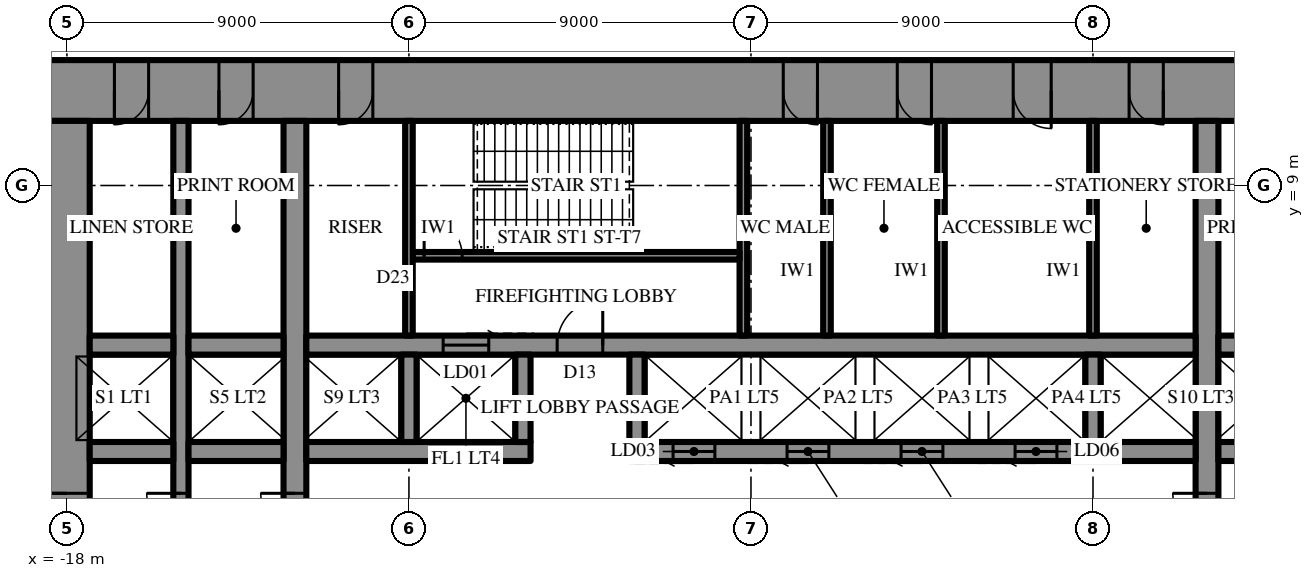
"""IFC4 building model, lengths in metres.
Left out: names, types, materials, properties, quantities, classifications, styles, units other than length and angle.
Written with IfcOpenShell. Run it as: python <this file> out.ifc"""

import sys

from ifc_helpers import new_model, si_unit, direction, frame, frame_2d, origin, place, context, subcontext, project, spatial, rectangle, extrude, element, fill, save


model = new_model("IFC4")
c1 = context("Model", 3, precision=1e-05, world=origin(), true_north=direction((0.0, 1.0)))
c2 = subcontext(c1, "Body", "Model", "MODEL_VIEW")
j1 = project(units=[si_unit("LENGTHUNIT", "METRE"), si_unit("PLANEANGLEUNIT", "RADIAN")], contexts=[c1])
p1 = place(None, origin())
s1 = spatial("IfcSite", under=j1, at=p1, CompositionType="ELEMENT")
p2 = place(p1, origin())
s2 = spatial("IfcBuilding", under=s1, at=p2, CompositionType="ELEMENT")
p3 = place(p2, frame((0.0, 0.0, 13.0)))
s3 = spatial("IfcBuildingStorey", under=s2, at=p3, CompositionType="ELEMENT", Elevation=13.0)
p4 = place(p3, frame((-18.6, 11.5, 0.0), z_axis=(0.0, 0.0, 1.0), x_axis=(1.0, 0.0, 0.0)))
e1 = element("IfcWall", 1, at=p4, inside=s3, PredefinedType="SHEAR", context=c2, shape_type="SweptSolid", body=[
    extrude(rectangle(XDim=37.2, YDim=1.6, at=frame_2d((18.6, 0.0))), origin(), (0.0, 0.0, 1.0), 5.5),
])
p5 = place(p4, frame((19.45, 0.0, 0.0)))
e2 = element("IfcOpeningElement", 2, at=p5, cuts=e1, PredefinedType="OPENING", context=c2, shape_type="SweptSolid", body=[
    extrude(rectangle(XDim=0.9, YDim=2.2, at=frame_2d((0.45, 1.1))), frame((0.0, 0.81, 0.0), z_axis=(0.0, -1.0, 0.0), x_axis=(1.0, 0.0, 0.0)), (0.0, 0.0, 1.0), 1.62),
])
p6 = place(p4, frame((22.45, 0.0, 0.0)))
e3 = element("IfcOpeningElement", 3, at=p6, cuts=e1, PredefinedType="OPENING", context=c2, shape_type="SweptSolid", body=[
    extrude(rectangle(XDim=0.9, YDim=2.2, at=frame_2d((0.45, 1.1))), frame((0.0, 0.81, 0.0), z_axis=(0.0, -1.0, 0.0), x_axis=(1.0, 0.0, 0.0)), (0.0, 0.0, 1.0), 1.62),
])
p7 = place(p4, frame((25.5, 0.0, 0.0)))
e4 = element("IfcOpeningElement", 4, at=p7, cuts=e1, PredefinedType="OPENING", context=c2, shape_type="SweptSolid", body=[
    extrude(rectangle(XDim=1.0, YDim=2.2, at=frame_2d((0.5, 1.1))), frame((0.0, 0.81, 0.0), z_axis=(0.0, -1.0, 0.0), x_axis=(1.0, 0.0, 0.0)), (0.0, 0.0, 1.0), 1.62),
])
p8 = place(p4, frame((1.85, 0.0, 0.0)))
e5 = element("IfcOpeningElement", 5, at=p8, cuts=e1, PredefinedType="OPENING", context=c2, shape_type="SweptSolid", body=[
    extrude(rectangle(XDim=0.9, YDim=2.2, at=frame_2d((0.45, 1.1))), frame((0.0, 0.81, 0.0), z_axis=(0.0, -1.0, 0.0), x_axis=(1.0, 0.0, 0.0)), (0.0, 0.0, 1.0), 1.62),
])
p9 = place(p4, frame((4.6, 0.0, 0.0)))
e6 = element("IfcOpeningElement", 6, at=p9, cuts=e1, PredefinedType="OPENING", context=c2, shape_type="SweptSolid", body=[
    extrude(rectangle(XDim=0.9, YDim=2.2, at=frame_2d((0.45, 1.1))), frame((0.0, 0.81, 0.0), z_axis=(0.0, -1.0, 0.0), x_axis=(1.0, 0.0, 0.0)), (0.0, 0.0, 1.0), 1.62),
])
p10 = place(p4, frame((7.75, 0.0, 0.0)))
e7 = element("IfcOpeningElement", 7, at=p10, cuts=e1, PredefinedType="OPENING", context=c2, shape_type="SweptSolid", body=[
    extrude(rectangle(XDim=0.9, YDim=2.2, at=frame_2d((0.45, 1.1))), frame((0.0, 0.81, 0.0), z_axis=(0.0, -1.0, 0.0), x_axis=(1.0, 0.0, 0.0)), (0.0, 0.0, 1.0), 1.62),
])
p11 = place(p4, frame((28.55, 0.0, 0.0)))
e8 = element("IfcOpeningElement", 8, at=p11, cuts=e1, PredefinedType="OPENING", context=c2, shape_type="SweptSolid", body=[
    extrude(rectangle(XDim=0.9, YDim=2.2, at=frame_2d((0.45, 1.1))), frame((0.0, 0.81, 0.0), z_axis=(0.0, -1.0, 0.0), x_axis=(1.0, 0.0, 0.0)), (0.0, 0.0, 1.0), 1.62),
])
p12 = place(p4, frame((31.7, 0.0, 0.0)))
e9 = element("IfcOpeningElement", 9, at=p12, cuts=e1, PredefinedType="OPENING", context=c2, shape_type="SweptSolid", body=[
    extrude(rectangle(XDim=0.9, YDim=2.2, at=frame_2d((0.45, 1.1))), frame((0.0, 0.81, 0.0), z_axis=(0.0, -1.0, 0.0), x_axis=(1.0, 0.0, 0.0)), (0.0, 0.0, 1.0), 1.62),
])
p13 = place(p4, frame((34.45, 0.0, 0.0)))
e10 = element("IfcOpeningElement", 10, at=p13, cuts=e1, PredefinedType="OPENING", context=c2, shape_type="SweptSolid", body=[
    extrude(rectangle(XDim=0.9, YDim=2.2, at=frame_2d((0.45, 1.1))), frame((0.0, 0.81, 0.0), z_axis=(0.0, -1.0, 0.0), x_axis=(1.0, 0.0, 0.0)), (0.0, 0.0, 1.0), 1.62),
])
p14 = place(p3, frame((-18.0, 10.7, 0.0), z_axis=(0.0, 0.0, 1.0), x_axis=(0.0, -1.0, 0.0)))
e11 = element("IfcWall", 11, at=p14, inside=s3, PredefinedType="SHEAR", context=c2, shape_type="SweptSolid", body=[
    extrude(rectangle(XDim=21.4, YDim=1.2, at=frame_2d((10.7, 0.0))), origin(), (0.0, 0.0, 1.0), 5.5),
])
p15 = place(p14, frame((9.8, 0.0, 0.0)))
e12 = element("IfcOpeningElement", 12, at=p15, cuts=e11, PredefinedType="OPENING", context=c2, shape_type="SweptSolid", body=[
    extrude(rectangle(XDim=1.8, YDim=2.4, at=frame_2d((0.9, 1.2))), frame((0.0, 0.61, 0.0), z_axis=(0.0, -1.0, 0.0), x_axis=(1.0, 0.0, 0.0)), (0.0, 0.0, 1.0), 1.22),
])
p16 = place(p3, frame((12.0, -10.7, 0.0), z_axis=(0.0, 0.0, 1.0), x_axis=(0.0, 1.0, 0.0)))
e13 = element("IfcWall", 13, at=p16, inside=s3, PredefinedType="SHEAR", context=c2, shape_type="SweptSolid", body=[
    extrude(rectangle(XDim=21.4, YDim=0.6, at=frame_2d((10.7, 0.0))), origin(), (0.0, 0.0, 1.0), 5.5),
])
p17 = place(p16, frame((9.8, 0.0, 0.0)))
e14 = element("IfcOpeningElement", 14, at=p17, cuts=e13, PredefinedType="OPENING", context=c2, shape_type="SweptSolid", body=[
    extrude(rectangle(XDim=1.8, YDim=2.4, at=frame_2d((0.9, 1.2))), frame((0.0, 0.31, 0.0), z_axis=(0.0, -1.0, 0.0), x_axis=(1.0, 0.0, 0.0)), (0.0, 0.0, 1.0), 0.62),
])
p18 = place(p3, frame((-12.0, -10.7, 0.0), z_axis=(0.0, 0.0, 1.0), x_axis=(0.0, 1.0, 0.0)))
e15 = element("IfcWall", 15, at=p18, inside=s3, PredefinedType="SHEAR", context=c2, shape_type="SweptSolid", body=[
    extrude(rectangle(XDim=21.4, YDim=0.6, at=frame_2d((10.7, 0.0))), origin(), (0.0, 0.0, 1.0), 5.5),
])
p19 = place(p18, frame((9.8, 0.0, 0.0)))
e16 = element("IfcOpeningElement", 16, at=p19, cuts=e15, PredefinedType="OPENING", context=c2, shape_type="SweptSolid", body=[
    extrude(rectangle(XDim=1.8, YDim=2.4, at=frame_2d((0.9, 1.2))), frame((0.0, 0.31, 0.0), z_axis=(0.0, -1.0, 0.0), x_axis=(1.0, 0.0, 0.0)), (0.0, 0.0, 1.0), 0.62),
])
p20 = place(p3, frame((-15.0, -10.7, 0.0), z_axis=(0.0, 0.0, 1.0), x_axis=(0.0, 1.0, 0.0)))
e17 = element("IfcWall", 17, at=p20, inside=s3, PredefinedType="SHEAR", context=c2, shape_type="SweptSolid", body=[
    extrude(rectangle(XDim=21.4, YDim=0.4, at=frame_2d((10.7, 0.0))), origin(), (0.0, 0.0, 1.0), 5.5),
])
p21 = place(p20, frame((9.8, 0.0, 0.0)))
e18 = element("IfcOpeningElement", 18, at=p21, cuts=e17, PredefinedType="OPENING", context=c2, shape_type="SweptSolid", body=[
    extrude(rectangle(XDim=1.8, YDim=2.4, at=frame_2d((0.9, 1.2))), frame((0.0, 0.21, 0.0), z_axis=(0.0, -1.0, 0.0), x_axis=(1.0, 0.0, 0.0)), (0.0, 0.0, 1.0), 0.42),
])
p22 = place(p3, frame((-17.4, 2.0, 0.0), z_axis=(0.0, 0.0, 1.0), x_axis=(1.0, 0.0, 0.0)))
e19 = element("IfcWall", 19, at=p22, inside=s3, PredefinedType="SHEAR", context=c2, shape_type="SweptSolid", body=[
    extrude(rectangle(XDim=2.2, YDim=0.5, at=frame_2d((1.1, 0.0))), origin(), (0.0, 0.0, 1.0), 5.5),
])
p23 = place(p3, frame((-14.8, 2.0, 0.0), z_axis=(0.0, 0.0, 1.0), x_axis=(1.0, 0.0, 0.0)))
e20 = element("IfcWall", 20, at=p23, inside=s3, PredefinedType="SHEAR", context=c2, shape_type="SweptSolid", body=[
    extrude(rectangle(XDim=2.5, YDim=0.5, at=frame_2d((1.25, 0.0))), origin(), (0.0, 0.0, 1.0), 5.5),
])
p24 = place(p3, frame((-11.7, 2.0, 0.0), z_axis=(0.0, 0.0, 1.0), x_axis=(1.0, 0.0, 0.0)))
e21 = element("IfcWall", 21, at=p24, inside=s3, PredefinedType="SHEAR", context=c2, shape_type="SweptSolid", body=[
    extrude(rectangle(XDim=5.9, YDim=0.5, at=frame_2d((2.95, 0.0))), origin(), (0.0, 0.0, 1.0), 5.5),
])
p25 = place(p3, frame((-3.2, 2.0, 0.0), z_axis=(0.0, 0.0, 1.0), x_axis=(1.0, 0.0, 0.0)))
e22 = element("IfcWall", 22, at=p25, inside=s3, PredefinedType="SHEAR", context=c2, shape_type="SweptSolid", body=[
    extrude(rectangle(XDim=14.9, YDim=0.5, at=frame_2d((7.45, 0.0))), origin(), (0.0, 0.0, 1.0), 5.5),
])
p26 = place(p25, frame((1.15, 0.0, 0.0)))
e23 = element("IfcOpeningElement", 23, at=p26, cuts=e22, PredefinedType="OPENING", context=c2, shape_type="SweptSolid", body=[
    extrude(rectangle(XDim=1.1, YDim=2.2, at=frame_2d((0.55, 1.1))), frame((0.0, 0.26, 0.0), z_axis=(0.0, -1.0, 0.0), x_axis=(1.0, 0.0, 0.0)), (0.0, 0.0, 1.0), 0.52),
])
p27 = place(p25, frame((4.15, 0.0, 0.0)))
e24 = element("IfcOpeningElement", 24, at=p27, cuts=e22, PredefinedType="OPENING", context=c2, shape_type="SweptSolid", body=[
    extrude(rectangle(XDim=1.1, YDim=2.2, at=frame_2d((0.55, 1.1))), frame((0.0, 0.26, 0.0), z_axis=(0.0, -1.0, 0.0), x_axis=(1.0, 0.0, 0.0)), (0.0, 0.0, 1.0), 0.52),
])
p28 = place(p25, frame((7.15, 0.0, 0.0)))
e25 = element("IfcOpeningElement", 25, at=p28, cuts=e22, PredefinedType="OPENING", context=c2, shape_type="SweptSolid", body=[
    extrude(rectangle(XDim=1.1, YDim=2.2, at=frame_2d((0.55, 1.1))), frame((0.0, 0.26, 0.0), z_axis=(0.0, -1.0, 0.0), x_axis=(1.0, 0.0, 0.0)), (0.0, 0.0, 1.0), 0.52),
])
p29 = place(p25, frame((10.15, 0.0, 0.0)))
e26 = element("IfcOpeningElement", 26, at=p29, cuts=e22, PredefinedType="OPENING", context=c2, shape_type="SweptSolid", body=[
    extrude(rectangle(XDim=1.1, YDim=2.2, at=frame_2d((0.55, 1.1))), frame((0.0, 0.26, 0.0), z_axis=(0.0, -1.0, 0.0), x_axis=(1.0, 0.0, 0.0)), (0.0, 0.0, 1.0), 0.52),
])
p30 = place(p3, frame((12.3, 2.0, 0.0), z_axis=(0.0, 0.0, 1.0), x_axis=(1.0, 0.0, 0.0)))
e27 = element("IfcWall", 27, at=p30, inside=s3, PredefinedType="SHEAR", context=c2, shape_type="SweptSolid", body=[
    extrude(rectangle(XDim=2.5, YDim=0.5, at=frame_2d((1.25, 0.0))), origin(), (0.0, 0.0, 1.0), 5.5),
])
p31 = place(p3, frame((-17.4, 4.8, 0.0), z_axis=(0.0, 0.0, 1.0), x_axis=(1.0, 0.0, 0.0)))
e28 = element("IfcWall", 28, at=p31, inside=s3, PredefinedType="SHEAR", context=c2, shape_type="SweptSolid", body=[
    extrude(rectangle(XDim=2.2, YDim=0.5, at=frame_2d((1.1, 0.0))), origin(), (0.0, 0.0, 1.0), 5.5),
])
p32 = place(p3, frame((-14.8, 4.8, 0.0), z_axis=(0.0, 0.0, 1.0), x_axis=(1.0, 0.0, 0.0)))
e29 = element("IfcWall", 29, at=p32, inside=s3, PredefinedType="SHEAR", context=c2, shape_type="SweptSolid", body=[
    extrude(rectangle(XDim=2.5, YDim=0.5, at=frame_2d((1.25, 0.0))), origin(), (0.0, 0.0, 1.0), 5.5),
])
p33 = place(p3, frame((-11.7, 4.8, 0.0), z_axis=(0.0, 0.0, 1.0), x_axis=(1.0, 0.0, 0.0)))
e30 = element("IfcWall", 30, at=p33, inside=s3, PredefinedType="SHEAR", context=c2, shape_type="SweptSolid", body=[
    extrude(rectangle(XDim=23.4, YDim=0.5, at=frame_2d((11.7, 0.0))), origin(), (0.0, 0.0, 1.0), 5.5),
])
p34 = place(p33, frame((6.6, 0.0, 0.0)))
e31 = element("IfcOpeningElement", 31, at=p34, cuts=e30, PredefinedType="OPENING", context=c2, shape_type="SweptSolid", body=[
    extrude(rectangle(XDim=1.2, YDim=2.2, at=frame_2d((0.6, 1.1))), frame((0.0, 0.26, 0.0), z_axis=(0.0, -1.0, 0.0), x_axis=(1.0, 0.0, 0.0)), (0.0, 0.0, 1.0), 0.52),
])
p35 = place(p33, frame((3.6, 0.0, 0.0)))
e32 = element("IfcOpeningElement", 32, at=p35, cuts=e30, PredefinedType="OPENING", context=c2, shape_type="SweptSolid", body=[
    extrude(rectangle(XDim=1.2, YDim=2.2, at=frame_2d((0.6, 1.1))), frame((0.0, 0.26, 0.0), z_axis=(0.0, -1.0, 0.0), x_axis=(1.0, 0.0, 0.0)), (0.0, 0.0, 1.0), 0.52),
])
p36 = place(p3, frame((12.3, 4.8, 0.0), z_axis=(0.0, 0.0, 1.0), x_axis=(1.0, 0.0, 0.0)))
e33 = element("IfcWall", 33, at=p36, inside=s3, PredefinedType="SHEAR", context=c2, shape_type="SweptSolid", body=[
    extrude(rectangle(XDim=2.5, YDim=0.5, at=frame_2d((1.25, 0.0))), origin(), (0.0, 0.0, 1.0), 5.5),
])
for number, where, z_axis, x_axis in (
    (34, (-9.0, 2.25, 0.0), (0.0, 0.0, 1.0), (0.0, 1.0, 0.0)),
    (35, (-6.0, 2.25, 0.0), (0.0, 0.0, 1.0), (0.0, 1.0, 0.0)),
    (36, (-3.0, 2.25, 0.0), (0.0, 0.0, 1.0), (0.0, 1.0, 0.0)),
    (37, (9.0, 2.25, 0.0), (0.0, 0.0, 1.0), (0.0, 1.0, 0.0)),
):
    element("IfcWall", number, at=place(p3, frame(where, z_axis=z_axis, x_axis=x_axis)), inside=s3, PredefinedType="SHEAR", context=c2, shape_type="SweptSolid", body=[
        extrude(rectangle(XDim=2.3, YDim=0.4, at=frame_2d((1.15, 0.0))), origin(), (0.0, 0.0, 1.0), 5.5),
    ])
p37 = place(p3, frame((-0.2, 5.05, 0.0), z_axis=(0.0, 0.0, 1.0), x_axis=(0.0, 1.0, 0.0)))
e38 = element("IfcWall", 38, at=p37, inside=s3, PredefinedType="SHEAR", context=c2, shape_type="SweptSolid", body=[
    extrude(rectangle(XDim=5.65, YDim=0.2, at=frame_2d((2.825, 0.0))), origin(), (0.0, 0.0, 1.0), 5.5),
])
p38 = place(p3, frame((-8.9, 7.15, 0.0), z_axis=(0.0, 0.0, 1.0), x_axis=(1.0, 0.0, 0.0)))
e39 = element("IfcWall", 39, at=p38, inside=s3, PredefinedType="SHEAR", context=c2, shape_type="SweptSolid", body=[
    extrude(rectangle(XDim=8.6, YDim=0.2, at=frame_2d((4.3, 0.0))), origin(), (0.0, 0.0, 1.0), 5.5),
])
p39 = place(p38, frame((0.3, 0.0, 0.0)))
e40 = element("IfcOpeningElement", 40, at=p39, cuts=e39, PredefinedType="OPENING", context=c2, shape_type="SweptSolid", body=[
    extrude(rectangle(XDim=1.0, YDim=2.2, at=frame_2d((0.5, 1.1))), frame((0.0, 0.11, 0.0), z_axis=(0.0, -1.0, 0.0), x_axis=(1.0, 0.0, 0.0)), (0.0, 0.0, 1.0), 0.22),
])
for number, where, z_axis, x_axis in (
    (41, (-9.0, 5.05, 0.0), (0.0, 0.0, 1.0), (0.0, 1.0, 0.0)),
    (42, (9.0, 5.05, 0.0), (0.0, 0.0, 1.0), (0.0, 1.0, 0.0)),
    (43, (2.0, 5.05, 0.0), (0.0, 0.0, 1.0), (0.0, 1.0, 0.0)),
    (44, (5.0, 5.05, 0.0), (0.0, 0.0, 1.0), (0.0, 1.0, 0.0)),
):
    element("IfcWall", number, at=place(p3, frame(where, z_axis=z_axis, x_axis=x_axis)), inside=s3, PredefinedType="PARTITIONING", context=c2, shape_type="SweptSolid", body=[
        extrude(rectangle(XDim=5.65, YDim=0.2, at=frame_2d((2.825, 0.0))), origin(), (0.0, 0.0, 1.0), 5.15),
    ])
p40 = place(p15, frame((1.8, 0.0, 0.0), z_axis=(0.0, 0.0, 1.0), x_axis=(-1.0, 0.0, 0.0)))
e45 = element("IfcDoor", 45, at=p40, inside=s3, OperationType="DOUBLE_DOOR_SINGLE_SWING", PredefinedType="DOOR", context=c2, shape_type="SweptSolid", body=[
    extrude(rectangle(XDim=1.8, YDim=2.4, at=frame_2d((0.9, 1.2))), frame((0.0, 0.025, 0.0), z_axis=(0.0, -1.0, 0.0), x_axis=(1.0, 0.0, 0.0)), (0.0, 0.0, 1.0), 0.05),
])
fill(e12, e45)
p41 = place(p34, origin())
e46 = element("IfcDoor", 46, at=p41, inside=s3, OperationType="SINGLE_SWING_LEFT", PredefinedType="DOOR", context=c2, shape_type="SweptSolid", body=[
    extrude(rectangle(XDim=1.2, YDim=2.2, at=frame_2d((0.6, 1.1))), frame((0.0, 0.025, 0.0), z_axis=(0.0, -1.0, 0.0), x_axis=(1.0, 0.0, 0.0)), (0.0, 0.0, 1.0), 0.05),
])
fill(e31, e46)
p42 = place(p39, origin())
e47 = element("IfcDoor", 47, at=p42, inside=s3, OperationType="SINGLE_SWING_RIGHT", PredefinedType="DOOR", context=c2, shape_type="SweptSolid", body=[
    extrude(rectangle(XDim=1.0, YDim=2.2, at=frame_2d((0.5, 1.1))), frame((0.0, 0.025, 0.0), z_axis=(0.0, -1.0, 0.0), x_axis=(1.0, 0.0, 0.0)), (0.0, 0.0, 1.0), 0.05),
])
fill(e40, e47)
p43 = place(p5, frame((0.9, 0.0, 0.0), z_axis=(0.0, 0.0, 1.0), x_axis=(-1.0, 0.0, 0.0)))
e48 = element("IfcDoor", 48, at=p43, inside=s3, OperationType="SINGLE_SWING_RIGHT", PredefinedType="DOOR", context=c2, shape_type="SweptSolid", body=[
    extrude(rectangle(XDim=0.9, YDim=2.2, at=frame_2d((0.45, 1.1))), frame((0.0, 0.025, 0.0), z_axis=(0.0, -1.0, 0.0), x_axis=(1.0, 0.0, 0.0)), (0.0, 0.0, 1.0), 0.05),
])
fill(e2, e48)
p44 = place(p6, frame((0.9, 0.0, 0.0), z_axis=(0.0, 0.0, 1.0), x_axis=(-1.0, 0.0, 0.0)))
e49 = element("IfcDoor", 49, at=p44, inside=s3, OperationType="SINGLE_SWING_RIGHT", PredefinedType="DOOR", context=c2, shape_type="SweptSolid", body=[
    extrude(rectangle(XDim=0.9, YDim=2.2, at=frame_2d((0.45, 1.1))), frame((0.0, 0.025, 0.0), z_axis=(0.0, -1.0, 0.0), x_axis=(1.0, 0.0, 0.0)), (0.0, 0.0, 1.0), 0.05),
])
fill(e3, e49)
p45 = place(p7, frame((1.0, 0.0, 0.0), z_axis=(0.0, 0.0, 1.0), x_axis=(-1.0, 0.0, 0.0)))
e50 = element("IfcDoor", 50, at=p45, inside=s3, OperationType="SINGLE_SWING_RIGHT", PredefinedType="DOOR", context=c2, shape_type="SweptSolid", body=[
    extrude(rectangle(XDim=1.0, YDim=2.2, at=frame_2d((0.5, 1.1))), frame((0.0, 0.025, 0.0), z_axis=(0.0, -1.0, 0.0), x_axis=(1.0, 0.0, 0.0)), (0.0, 0.0, 1.0), 0.05),
])
fill(e4, e50)
p46 = place(p8, frame((0.9, 0.0, 0.0), z_axis=(0.0, 0.0, 1.0), x_axis=(-1.0, 0.0, 0.0)))
e51 = element("IfcDoor", 51, at=p46, inside=s3, OperationType="SINGLE_SWING_LEFT", PredefinedType="DOOR", context=c2, shape_type="SweptSolid", body=[
    extrude(rectangle(XDim=0.9, YDim=2.2, at=frame_2d((0.45, 1.1))), frame((0.0, 0.025, 0.0), z_axis=(0.0, -1.0, 0.0), x_axis=(1.0, 0.0, 0.0)), (0.0, 0.0, 1.0), 0.05),
])
fill(e5, e51)
p47 = place(p9, frame((0.9, 0.0, 0.0), z_axis=(0.0, 0.0, 1.0), x_axis=(-1.0, 0.0, 0.0)))
e52 = element("IfcDoor", 52, at=p47, inside=s3, OperationType="SINGLE_SWING_LEFT", PredefinedType="DOOR", context=c2, shape_type="SweptSolid", body=[
    extrude(rectangle(XDim=0.9, YDim=2.2, at=frame_2d((0.45, 1.1))), frame((0.0, 0.025, 0.0), z_axis=(0.0, -1.0, 0.0), x_axis=(1.0, 0.0, 0.0)), (0.0, 0.0, 1.0), 0.05),
])
fill(e6, e52)
p48 = place(p10, frame((0.9, 0.0, 0.0), z_axis=(0.0, 0.0, 1.0), x_axis=(-1.0, 0.0, 0.0)))
e53 = element("IfcDoor", 53, at=p48, inside=s3, OperationType="SINGLE_SWING_LEFT", PredefinedType="DOOR", context=c2, shape_type="SweptSolid", body=[
    extrude(rectangle(XDim=0.9, YDim=2.2, at=frame_2d((0.45, 1.1))), frame((0.0, 0.025, 0.0), z_axis=(0.0, -1.0, 0.0), x_axis=(1.0, 0.0, 0.0)), (0.0, 0.0, 1.0), 0.05),
])
fill(e7, e53)
p49 = place(p11, frame((0.9, 0.0, 0.0), z_axis=(0.0, 0.0, 1.0), x_axis=(-1.0, 0.0, 0.0)))
e54 = element("IfcDoor", 54, at=p49, inside=s3, OperationType="SINGLE_SWING_RIGHT", PredefinedType="DOOR", context=c2, shape_type="SweptSolid", body=[
    extrude(rectangle(XDim=0.9, YDim=2.2, at=frame_2d((0.45, 1.1))), frame((0.0, 0.025, 0.0), z_axis=(0.0, -1.0, 0.0), x_axis=(1.0, 0.0, 0.0)), (0.0, 0.0, 1.0), 0.05),
])
fill(e8, e54)
p50 = place(p17, origin())
e55 = element("IfcDoor", 55, at=p50, inside=s3, OperationType="DOUBLE_DOOR_SINGLE_SWING", PredefinedType="DOOR", context=c2, shape_type="SweptSolid", body=[
    extrude(rectangle(XDim=1.8, YDim=2.4, at=frame_2d((0.9, 1.2))), frame((0.0, 0.025, 0.0), z_axis=(0.0, -1.0, 0.0), x_axis=(1.0, 0.0, 0.0)), (0.0, 0.0, 1.0), 0.05),
])
fill(e14, e55)
p51 = place(p19, origin())
e56 = element("IfcDoor", 56, at=p51, inside=s3, OperationType="DOUBLE_DOOR_SINGLE_SWING", PredefinedType="DOOR", context=c2, shape_type="SweptSolid", body=[
    extrude(rectangle(XDim=1.8, YDim=2.4, at=frame_2d((0.9, 1.2))), frame((0.0, 0.025, 0.0), z_axis=(0.0, -1.0, 0.0), x_axis=(1.0, 0.0, 0.0)), (0.0, 0.0, 1.0), 0.05),
])
fill(e16, e56)
p52 = place(p21, origin())
e57 = element("IfcDoor", 57, at=p52, inside=s3, OperationType="DOUBLE_DOOR_SINGLE_SWING", PredefinedType="DOOR", context=c2, shape_type="SweptSolid", body=[
    extrude(rectangle(XDim=1.8, YDim=2.4, at=frame_2d((0.9, 1.2))), frame((0.0, 0.025, 0.0), z_axis=(0.0, -1.0, 0.0), x_axis=(1.0, 0.0, 0.0)), (0.0, 0.0, 1.0), 0.05),
])
fill(e18, e57)
p53 = place(p35, origin())
e58 = element("IfcDoor", 58, at=p53, inside=s3, OperationType="SLIDING_TO_LEFT", PredefinedType="DOOR", context=c2, shape_type="SweptSolid", body=[
    extrude(rectangle(XDim=1.2, YDim=2.2, at=frame_2d((0.6, 1.1))), frame((0.0, 0.025, 0.0), z_axis=(0.0, -1.0, 0.0), x_axis=(1.0, 0.0, 0.0)), (0.0, 0.0, 1.0), 0.05),
])
fill(e32, e58)
p54 = place(p26, frame((1.1, 0.0, 0.0), z_axis=(0.0, 0.0, 1.0), x_axis=(-1.0, 0.0, 0.0)))
e59 = element("IfcDoor", 59, at=p54, inside=s3, OperationType="SLIDING_TO_LEFT", PredefinedType="DOOR", context=c2, shape_type="SweptSolid", body=[
    extrude(rectangle(XDim=1.1, YDim=2.2, at=frame_2d((0.55, 1.1))), frame((0.0, 0.025, 0.0), z_axis=(0.0, -1.0, 0.0), x_axis=(1.0, 0.0, 0.0)), (0.0, 0.0, 1.0), 0.05),
])
fill(e23, e59)
p55 = place(p27, frame((1.1, 0.0, 0.0), z_axis=(0.0, 0.0, 1.0), x_axis=(-1.0, 0.0, 0.0)))
e60 = element("IfcDoor", 60, at=p55, inside=s3, OperationType="SLIDING_TO_LEFT", PredefinedType="DOOR", context=c2, shape_type="SweptSolid", body=[
    extrude(rectangle(XDim=1.1, YDim=2.2, at=frame_2d((0.55, 1.1))), frame((0.0, 0.025, 0.0), z_axis=(0.0, -1.0, 0.0), x_axis=(1.0, 0.0, 0.0)), (0.0, 0.0, 1.0), 0.05),
])
fill(e24, e60)
p56 = place(p28, frame((1.1, 0.0, 0.0), z_axis=(0.0, 0.0, 1.0), x_axis=(-1.0, 0.0, 0.0)))
e61 = element("IfcDoor", 61, at=p56, inside=s3, OperationType="SLIDING_TO_LEFT", PredefinedType="DOOR", context=c2, shape_type="SweptSolid", body=[
    extrude(rectangle(XDim=1.1, YDim=2.2, at=frame_2d((0.55, 1.1))), frame((0.0, 0.025, 0.0), z_axis=(0.0, -1.0, 0.0), x_axis=(1.0, 0.0, 0.0)), (0.0, 0.0, 1.0), 0.05),
])
fill(e25, e61)
p57 = place(p29, frame((1.1, 0.0, 0.0), z_axis=(0.0, 0.0, 1.0), x_axis=(-1.0, 0.0, 0.0)))
e62 = element("IfcDoor", 62, at=p57, inside=s3, OperationType="SLIDING_TO_LEFT", PredefinedType="DOOR", context=c2, shape_type="SweptSolid", body=[
    extrude(rectangle(XDim=1.1, YDim=2.2, at=frame_2d((0.55, 1.1))), frame((0.0, 0.025, 0.0), z_axis=(0.0, -1.0, 0.0), x_axis=(1.0, 0.0, 0.0)), (0.0, 0.0, 1.0), 0.05),
])
fill(e26, e62)
save(model, sys.argv[1])
